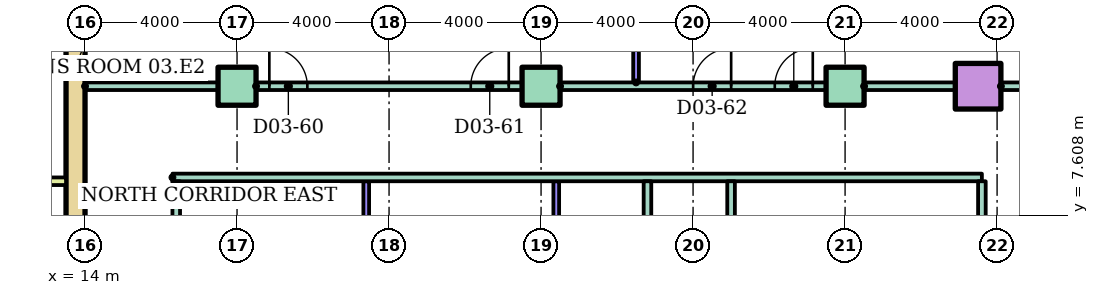
"""IFC4 building model, lengths in metres.
Left out: names, types, materials, properties, quantities, classifications, styles, units other than length and angle.
Written with IfcOpenShell. Run it as: python <this file> out.ifc"""

import sys

from ifc_helpers import new_model, si_unit, direction, frame, frame_2d, origin, origin_2d, place, context, subcontext, project, spatial, rectangle, hollow_rectangle, extrude, element, fill, save


model = new_model("IFC4")
c1 = context("Model", 3, precision=1e-05, world=origin(), true_north=direction((0.0, 1.0)))
c2 = subcontext(c1, "Body", "Model", "MODEL_VIEW")
j1 = project(units=[si_unit("LENGTHUNIT", "METRE"), si_unit("PLANEANGLEUNIT", "RADIAN")], contexts=[c1])
p1 = place(None, origin())
s1 = spatial("IfcSite", under=j1, at=p1, CompositionType="ELEMENT")
p2 = place(p1, origin())
s2 = spatial("IfcBuilding", under=s1, at=p2, CompositionType="ELEMENT")
p3 = place(p2, frame((0.0, 0.0, 14.0)))
s3 = spatial("IfcBuildingStorey", under=s2, at=p3, CompositionType="ELEMENT", Elevation=14.0)
for number, where in (
    (1, (18.0, 11.0, 0.0)),
    (2, (26.0, 11.0, 0.0)),
    (3, (34.0, 11.0, 0.0)),
):
    element("IfcColumn", number, at=place(p3, frame(where)), inside=s3, PredefinedType="COLUMN", context=c2, shape_type="SweptSolid", body=[
        extrude(rectangle(XDim=1.0, YDim=1.0, at=origin_2d()), origin(), (0.0, 0.0, 1.0), 4.0),
    ])
p4 = place(p3, frame((37.5, 11.0, 0.0)))
e4 = element("IfcColumn", 4, at=p4, inside=s3, PredefinedType="COLUMN", context=c2, shape_type="SweptSolid", body=[
    extrude(hollow_rectangle(XDim=1.2, YDim=1.2, WallThickness=0.06, at=origin_2d()), origin(), (0.0, 0.0, 1.0), 4.0),
])
p5 = place(p3, frame((13.75, 3.0, 0.0), z_axis=(0.0, 0.0, 1.0), x_axis=(0.0, 1.0, 0.0)))
e5 = element("IfcWall", 5, at=p5, inside=s3, PredefinedType="SHEAR", context=c2, shape_type="SweptSolid", body=[
    extrude(rectangle(XDim=17.0, YDim=0.5, at=frame_2d((8.5, 0.0))), origin(), (0.0, 0.0, 1.0), 3.7),
])
p6 = place(p3, frame((9.6, 8.5, 0.0)))
e6 = element("IfcWall", 6, at=p6, inside=s3, PredefinedType="PARTITIONING", context=c2, shape_type="SweptSolid", body=[
    extrude(rectangle(XDim=3.9, YDim=0.2, at=frame_2d((1.95, 0.0))), origin(), (0.0, 0.0, 1.0), 3.7),
])
p7 = place(p3, frame((16.3, 8.6, 0.0)))
e7 = element("IfcWall", 7, at=p7, inside=s3, PredefinedType="PARTITIONING", context=c2, shape_type="SweptSolid", body=[
    extrude(rectangle(XDim=21.3, YDim=0.2, at=frame_2d((10.65, 0.0))), origin(), (0.0, 0.0, 1.0), 3.7),
])
p8 = place(p3, frame((14.0, 11.0, 0.0)))
e8 = element("IfcWall", 8, at=p8, inside=s3, PredefinedType="PARTITIONING", context=c2, shape_type="SweptSolid", body=[
    extrude(rectangle(XDim=3.5, YDim=0.2, at=frame_2d((1.75, 0.0))), origin(), (0.0, 0.0, 1.0), 3.7),
])
p9 = place(p3, frame((18.5, 11.0, 0.0)))
e9 = element("IfcWall", 9, at=p9, inside=s3, PredefinedType="PARTITIONING", context=c2, shape_type="SweptSolid", body=[
    extrude(rectangle(XDim=7.0, YDim=0.2, at=frame_2d((3.5, 0.0))), origin(), (0.0, 0.0, 1.0), 3.7),
])
p10 = place(p9, frame((0.35, 0.0, 0.0)))
e10 = element("IfcOpeningElement", 10, at=p10, cuts=e9, PredefinedType="OPENING", context=c2, shape_type="SweptSolid", body=[
    extrude(rectangle(XDim=1.0, YDim=2.1, at=frame_2d((0.5, 1.05))), frame((0.0, 0.11, 0.0), z_axis=(0.0, -1.0, 0.0), x_axis=(1.0, 0.0, 0.0)), (0.0, 0.0, 1.0), 0.22),
])
p11 = place(p9, frame((5.65, 0.0, 0.0)))
e11 = element("IfcOpeningElement", 11, at=p11, cuts=e9, PredefinedType="OPENING", context=c2, shape_type="SweptSolid", body=[
    extrude(rectangle(XDim=1.0, YDim=2.1, at=frame_2d((0.5, 1.05))), frame((0.0, 0.11, 0.0), z_axis=(0.0, -1.0, 0.0), x_axis=(1.0, 0.0, 0.0)), (0.0, 0.0, 1.0), 0.22),
])
p12 = place(p3, frame((26.5, 11.0, 0.0)))
e12 = element("IfcWall", 12, at=p12, inside=s3, PredefinedType="PARTITIONING", context=c2, shape_type="SweptSolid", body=[
    extrude(rectangle(XDim=7.0, YDim=0.2, at=frame_2d((3.5, 0.0))), origin(), (0.0, 0.0, 1.0), 3.7),
])
p13 = place(p12, frame((3.502, 0.0, 0.0)))
e13 = element("IfcOpeningElement", 13, at=p13, cuts=e12, PredefinedType="OPENING", context=c2, shape_type="SweptSolid", body=[
    extrude(rectangle(XDim=1.0, YDim=2.1, at=frame_2d((0.5, 1.05))), frame((0.0, 0.11, 0.0), z_axis=(0.0, -1.0, 0.0), x_axis=(1.0, 0.0, 0.0)), (0.0, 0.0, 1.0), 0.22),
])
p14 = place(p12, frame((5.65, 0.0, 0.0)))
e14 = element("IfcOpeningElement", 14, at=p14, cuts=e12, PredefinedType="OPENING", context=c2, shape_type="SweptSolid", body=[
    extrude(rectangle(XDim=1.0, YDim=2.1, at=frame_2d((0.5, 1.05))), frame((0.0, 0.11, 0.0), z_axis=(0.0, -1.0, 0.0), x_axis=(1.0, 0.0, 0.0)), (0.0, 0.0, 1.0), 0.22),
])
p15 = place(p3, frame((34.5, 11.0, 0.0)))
e15 = element("IfcWall", 15, at=p15, inside=s3, PredefinedType="PARTITIONING", context=c2, shape_type="SweptSolid", body=[
    extrude(rectangle(XDim=2.4, YDim=0.2, at=frame_2d((1.2, 0.0))), origin(), (0.0, 0.0, 1.0), 3.7),
])
p16 = place(p3, frame((38.1, 11.0, 0.0)))
e16 = element("IfcWall", 16, at=p16, inside=s3, PredefinedType="PARTITIONING", context=c2, shape_type="SweptSolid", body=[
    extrude(rectangle(XDim=1.5, YDim=0.2, at=frame_2d((0.75, 0.0))), origin(), (0.0, 0.0, 1.0), 3.7),
])
p17 = place(p3, frame((16.4, 1.5, 0.0), z_axis=(0.0, 0.0, 1.0), x_axis=(0.0, 1.0, 0.0)))
e17 = element("IfcWall", 17, at=p17, inside=s3, PredefinedType="PARTITIONING", context=c2, shape_type="SweptSolid", body=[
    extrude(rectangle(XDim=7.0, YDim=0.2, at=frame_2d((3.5, 0.0))), origin(), (0.0, 0.0, 1.0), 3.7),
])
p18 = place(p3, frame((21.4, 1.5, 0.0), z_axis=(0.0, 0.0, 1.0), x_axis=(0.0, 1.0, 0.0)))
e18 = element("IfcWall", 18, at=p18, inside=s3, PredefinedType="PARTITIONING", context=c2, shape_type="SweptSolid", body=[
    extrude(rectangle(XDim=7.0, YDim=0.15, at=frame_2d((3.5, 0.0))), origin(), (0.0, 0.0, 1.0), 3.7),
])
p19 = place(p3, frame((26.4, 2.5, 0.0), z_axis=(0.0, 0.0, 1.0), x_axis=(0.0, 1.0, 0.0)))
e19 = element("IfcWall", 19, at=p19, inside=s3, PredefinedType="PARTITIONING", context=c2, shape_type="SweptSolid", body=[
    extrude(rectangle(XDim=6.0, YDim=0.15, at=frame_2d((3.0, 0.0))), origin(), (0.0, 0.0, 1.0), 3.7),
])
p20 = place(p3, frame((28.5, 11.1, 0.0), z_axis=(0.0, 0.0, 1.0), x_axis=(0.0, 1.0, 0.0)))
e20 = element("IfcWall", 20, at=p20, inside=s3, PredefinedType="PARTITIONING", context=c2, shape_type="SweptSolid", body=[
    extrude(rectangle(XDim=8.5, YDim=0.15, at=frame_2d((4.25, 0.0))), origin(), (0.0, 0.0, 1.0), 3.7),
])
for number, where, z_axis, x_axis in (
    (21, (28.8, 1.5, 0.0), (0.0, 0.0, 1.0), (0.0, 1.0, 0.0)),
    (22, (31.0, 1.5, 0.0), (0.0, 0.0, 1.0), (0.0, 1.0, 0.0)),
):
    element("IfcWall", number, at=place(p3, frame(where, z_axis=z_axis, x_axis=x_axis)), inside=s3, PredefinedType="PARTITIONING", context=c2, shape_type="SweptSolid", body=[
        extrude(rectangle(XDim=7.0, YDim=0.2, at=frame_2d((3.5, 0.0))), origin(), (0.0, 0.0, 1.0), 3.7),
    ])
p21 = place(p3, frame((37.6, 2.6, 0.0), z_axis=(0.0, 0.0, 1.0), x_axis=(0.0, 1.0, 0.0)))
e23 = element("IfcWall", 23, at=p21, inside=s3, PredefinedType="PARTITIONING", context=c2, shape_type="SweptSolid", body=[
    extrude(rectangle(XDim=5.9, YDim=0.2, at=frame_2d((2.95, 0.0))), origin(), (0.0, 0.0, 1.0), 3.7),
])
p22 = place(p21, frame((1.9, 0.0, 0.0)))
e24 = element("IfcOpeningElement", 24, at=p22, cuts=e23, PredefinedType="OPENING", context=c2, shape_type="SweptSolid", body=[
    extrude(rectangle(XDim=1.0, YDim=2.1, at=frame_2d((0.5, 1.05))), frame((0.0, 0.11, 0.0), z_axis=(0.0, -1.0, 0.0), x_axis=(1.0, 0.0, 0.0)), (0.0, 0.0, 1.0), 0.22),
])
p23 = place(p10, origin())
e25 = element("IfcDoor", 25, at=p23, inside=s3, OperationType="SINGLE_SWING_LEFT", PredefinedType="DOOR", context=c2, shape_type="SweptSolid", body=[
    extrude(rectangle(XDim=1.0, YDim=2.1, at=frame_2d((0.5, 1.05))), frame((0.0, 0.025, 0.0), z_axis=(0.0, -1.0, 0.0), x_axis=(1.0, 0.0, 0.0)), (0.0, 0.0, 1.0), 0.05),
])
fill(e10, e25)
p24 = place(p11, origin())
e26 = element("IfcDoor", 26, at=p24, inside=s3, OperationType="SINGLE_SWING_RIGHT", PredefinedType="DOOR", context=c2, shape_type="SweptSolid", body=[
    extrude(rectangle(XDim=1.0, YDim=2.1, at=frame_2d((0.5, 1.05))), frame((0.0, 0.025, 0.0), z_axis=(0.0, -1.0, 0.0), x_axis=(1.0, 0.0, 0.0)), (0.0, 0.0, 1.0), 0.05),
])
fill(e11, e26)
p25 = place(p13, origin())
e27 = element("IfcDoor", 27, at=p25, inside=s3, OperationType="SINGLE_SWING_RIGHT", PredefinedType="DOOR", context=c2, shape_type="SweptSolid", body=[
    extrude(rectangle(XDim=1.0, YDim=2.1, at=frame_2d((0.5, 1.05))), frame((0.0, 0.025, 0.0), z_axis=(0.0, -1.0, 0.0), x_axis=(1.0, 0.0, 0.0)), (0.0, 0.0, 1.0), 0.05),
])
fill(e13, e27)
p26 = place(p14, origin())
e28 = element("IfcDoor", 28, at=p26, inside=s3, OperationType="SINGLE_SWING_RIGHT", PredefinedType="DOOR", context=c2, shape_type="SweptSolid", body=[
    extrude(rectangle(XDim=1.0, YDim=2.1, at=frame_2d((0.5, 1.05))), frame((0.0, 0.025, 0.0), z_axis=(0.0, -1.0, 0.0), x_axis=(1.0, 0.0, 0.0)), (0.0, 0.0, 1.0), 0.05),
])
fill(e14, e28)
save(model, sys.argv[1])
